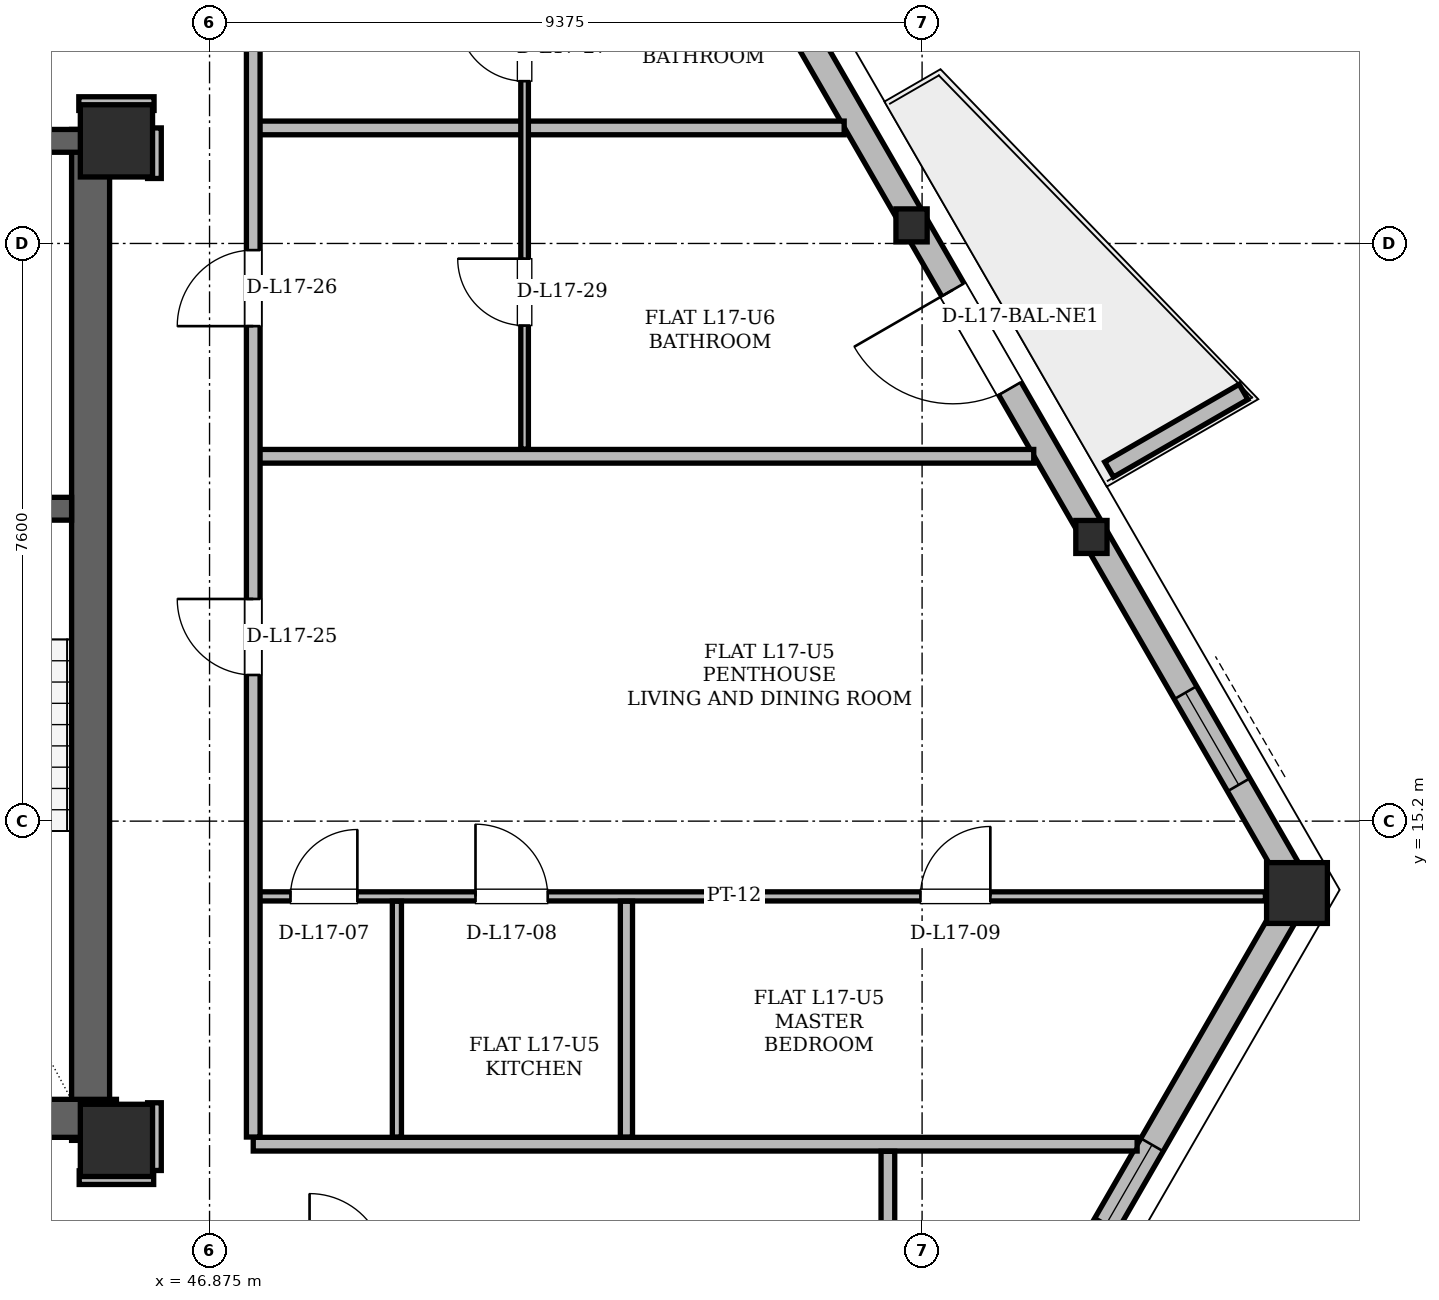
"""IFC4 building model, lengths in metres.
Left out: names, types, materials, properties, quantities, classifications, styles, units other than length and angle.
Written with IfcOpenShell. Run it as: python <this file> out.ifc"""

import sys

from ifc_helpers import new_model, si_unit, direction, frame, frame_2d, origin, origin_2d, place, context, subcontext, project, spatial, polyline, rectangle, hollow_rectangle, i_section, outline, extrude, element, fill, save


model = new_model("IFC4")
c1 = context("Model", 3, precision=1e-05, world=origin(), true_north=direction((0.0, 1.0)))
c2 = subcontext(c1, "Body", "Model", "MODEL_VIEW")
j1 = project(units=[si_unit("LENGTHUNIT", "METRE"), si_unit("PLANEANGLEUNIT", "RADIAN")], contexts=[c1])
p1 = place(None, origin())
s1 = spatial("IfcSite", under=j1, at=p1, CompositionType="ELEMENT")
p2 = place(p1, origin())
s2 = spatial("IfcBuilding", under=s1, at=p2, CompositionType="ELEMENT")
p3 = place(p2, frame((0.0, 0.0, 66.9)))
s3 = spatial("IfcBuildingStorey", under=s2, at=p3, CompositionType="ELEMENT", Elevation=66.9)
for number, where, z_axis, x_axis in (
    (1, (45.65, 11.0, 0.0), (0.0, 0.0, 1.0), (1.0, 0.0, 0.0)),
    (2, (45.65, 24.15, 0.0), (0.0, 0.0, 1.0), (1.0, 0.0, 0.0)),
):
    element("IfcColumn", number, at=place(p3, frame(where, z_axis=z_axis, x_axis=x_axis)), inside=s3, PredefinedType="COLUMN", context=c2, shape_type="SweptSolid", body=[
        extrude(hollow_rectangle(XDim=0.95, YDim=0.95, WallThickness=0.08, at=origin_2d()), origin(), (0.0, 0.0, 1.0), 3.6),
    ])
p4 = place(p3, frame((61.212, 14.297, 0.005), z_axis=(-0.016717385231, -0.023784897687, 0.999577314505), x_axis=(0.818132254309, -0.575030098743, 0.0)))
e3 = element("IfcColumn", 3, at=p4, inside=s3, PredefinedType="COLUMN", context=c2, shape_type="SweptSolid", body=[
    extrude(hollow_rectangle(XDim=0.8, YDim=0.8, WallThickness=0.065, at=origin_2d()), origin(), (0.0, 0.0, 1.0), 3.593),
])
p5 = place(p3, frame((58.511, 18.975, 0.005), z_axis=(-0.018688884401, -0.020387873892, 0.999617456929), x_axis=(0.737154140201, -0.675724628517, 0.0)))
e4 = element("IfcColumn", 4, at=p5, inside=s3, PredefinedType="COLUMN", context=c2, shape_type="SweptSolid", body=[
    extrude(i_section(OverallWidth=0.411, OverallDepth=0.434, WebThickness=0.036, FlangeThickness=0.057, at=origin_2d()), origin(), (0.0, 0.0, 1.0), 3.593),
])
p6 = place(p3, frame((56.148, 23.069, 0.005), z_axis=(-0.020388348906, -0.017398057733, 0.999640746877), x_axis=(0.649119270697, -0.760686645348, 0.0)))
e5 = element("IfcColumn", 5, at=p6, inside=s3, PredefinedType="COLUMN", context=c2, shape_type="SweptSolid", body=[
    extrude(i_section(OverallWidth=0.411, OverallDepth=0.434, WebThickness=0.036, FlangeThickness=0.057, at=origin_2d()), origin(), (0.0, 0.0, 1.0), 3.592),
])
p7 = place(p3, frame((45.31, 11.0, 0.0), z_axis=(0.0, 0.0, 1.0), x_axis=(0.0, 1.0, 0.0)))
e6 = element("IfcWall", 6, at=p7, inside=s3, PredefinedType="SHEAR", context=c2, shape_type="SweptSolid", body=[
    extrude(rectangle(XDim=13.3, YDim=0.5, at=frame_2d((6.65, 0.0))), origin(), (0.0, 0.0, 1.0), 3.36),
])
p8 = place(p3, frame((38.55, 11.29, 0.0), z_axis=(0.0, 0.0, 1.0), x_axis=(1.0, 0.0, 0.0)))
e7 = element("IfcWall", 7, at=p8, inside=s3, PredefinedType="SHEAR", context=c2, shape_type="SweptSolid", body=[
    extrude(rectangle(XDim=7.1, YDim=0.5, at=frame_2d((3.55, 0.0))), origin(), (0.0, 0.0, 1.0), 3.36),
])
p9 = place(p3, frame((29.65, 24.15, 0.0), z_axis=(0.0, 0.0, 1.0), x_axis=(1.0, 0.0, 0.0)))
e8 = element("IfcWall", 8, at=p9, inside=s3, PredefinedType="SHEAR", context=c2, shape_type="SweptSolid", body=[
    extrude(rectangle(XDim=15.7, YDim=0.3, at=frame_2d((7.85, 0.0))), origin(), (0.0, 0.0, 1.0), 3.36),
])
p10 = place(p9, frame((1.7, 0.0, 0.0)))
e9 = element("IfcOpeningElement", 9, at=p10, cuts=e8, PredefinedType="OPENING", context=c2, shape_type="SweptSolid", body=[
    extrude(rectangle(XDim=1.2, YDim=2.2, at=frame_2d((0.6, 1.1))), frame((0.0, 0.15, 0.0), z_axis=(0.0, -1.0, 0.0), x_axis=(1.0, 0.0, 0.0)), (0.0, 0.0, 1.0), 0.3),
])
p11 = place(p9, frame((12.8, 0.0, 0.0)))
e10 = element("IfcOpeningElement", 10, at=p11, cuts=e8, PredefinedType="OPENING", context=c2, shape_type="SweptSolid", body=[
    extrude(rectangle(XDim=1.2, YDim=2.2, at=frame_2d((0.6, 1.1))), frame((0.0, 0.15, 0.0), z_axis=(0.0, -1.0, 0.0), x_axis=(1.0, 0.0, 0.0)), (0.0, 0.0, 1.0), 0.3),
])
p12 = place(p9, frame((6.55, 0.0, 0.0)))
e11 = element("IfcOpeningElement", 11, at=p12, cuts=e8, PredefinedType="OPENING", context=c2, shape_type="SweptSolid", body=[
    extrude(rectangle(XDim=0.9, YDim=2.05, at=frame_2d((0.45, 1.025))), frame((0.0, 0.15, 0.0), z_axis=(0.0, -1.0, 0.0), x_axis=(1.0, 0.0, 0.0)), (0.0, 0.0, 1.0), 0.3),
])
p13 = place(p9, frame((8.45, 0.0, 0.0)))
e12 = element("IfcOpeningElement", 12, at=p13, cuts=e8, PredefinedType="OPENING", context=c2, shape_type="SweptSolid", body=[
    extrude(rectangle(XDim=0.9, YDim=2.05, at=frame_2d((0.45, 1.025))), frame((0.0, 0.15, 0.0), z_axis=(0.0, -1.0, 0.0), x_axis=(1.0, 0.0, 0.0)), (0.0, 0.0, 1.0), 0.3),
])
p14 = place(p3, frame((41.05, 19.31, 0.0), z_axis=(0.0, 0.0, 1.0), x_axis=(1.0, 0.0, 0.0)))
e13 = element("IfcWall", 13, at=p14, inside=s3, PredefinedType="SHEAR", context=c2, shape_type="SweptSolid", body=[
    extrude(rectangle(XDim=4.01, YDim=0.3, at=frame_2d((2.005, 0.0))), origin(), (0.0, 0.0, 1.0), 3.36),
])
p15 = place(p14, frame((1.6, 0.0, 0.0)))
e14 = element("IfcOpeningElement", 14, at=p15, cuts=e13, PredefinedType="OPENING", context=c2, shape_type="SweptSolid", body=[
    extrude(rectangle(XDim=1.4, YDim=2.2, at=frame_2d((0.7, 1.1))), frame((0.0, 0.15, 0.0), z_axis=(0.0, -1.0, 0.0), x_axis=(1.0, 0.0, 0.0)), (0.0, 0.0, 1.0), 0.3),
])
p16 = place(p3, frame((54.382, 2.466, 0.0), z_axis=(0.0, 0.0, 1.0), x_axis=(0.499986980295, 0.866032920584, 0.0)))
e15 = element("IfcWall", 15, at=p16, inside=s3, PredefinedType="SOLIDWALL", context=c2, shape_type="SweptSolid", body=[
    extrude(rectangle(XDim=13.661, YDim=0.34, at=frame_2d((6.831, 0.0))), origin(), (0.0, 0.0, 1.0), 2.494),
])
p17 = place(p16, frame((8.587, 0.0, 0.85)))
e16 = element("IfcOpeningElement", 16, at=p17, cuts=e15, PredefinedType="OPENING", context=c2, shape_type="SweptSolid", body=[
    extrude(rectangle(XDim=1.2, YDim=1.48, at=frame_2d((0.6, 0.74))), frame((0.0, 0.17, 0.0), z_axis=(0.0, -1.0, 0.0), x_axis=(1.0, 0.0, 0.0)), (0.0, 0.0, 1.0), 0.34),
])
p18 = place(p3, frame((61.212, 14.297, 0.0), z_axis=(0.0, 0.0, 1.0), x_axis=(-0.499997235847, 0.866026999663, 0.0)))
e17 = element("IfcWall", 17, at=p18, inside=s3, PredefinedType="SOLIDWALL", context=c2, shape_type="SweptSolid", body=[
    extrude(rectangle(XDim=33.763, YDim=0.34, at=frame_2d((16.882, 0.0))), origin(), (0.0, 0.0, 1.0), 2.494),
])
p19 = place(p18, frame((7.615, 0.0, 0.0)))
e18 = element("IfcOpeningElement", 18, at=p19, cuts=e17, PredefinedType="OPENING", context=c2, shape_type="SweptSolid", body=[
    extrude(rectangle(XDim=1.5, YDim=2.2, at=frame_2d((0.75, 1.1))), frame((0.0, 0.17, 0.0), z_axis=(0.0, -1.0, 0.0), x_axis=(1.0, 0.0, 0.0)), (0.0, 0.0, 1.0), 0.34),
])
p20 = place(p18, frame((25.894, 0.0, 0.0)))
e19 = element("IfcOpeningElement", 19, at=p20, cuts=e17, PredefinedType="OPENING", context=c2, shape_type="SweptSolid", body=[
    extrude(rectangle(XDim=1.5, YDim=2.2, at=frame_2d((0.75, 1.1))), frame((0.0, 0.17, 0.0), z_axis=(0.0, -1.0, 0.0), x_axis=(1.0, 0.0, 0.0)), (0.0, 0.0, 1.0), 0.34),
])
p21 = place(p18, frame((1.594, 0.0, 0.85)))
e20 = element("IfcOpeningElement", 20, at=p21, cuts=e17, PredefinedType="OPENING", context=c2, shape_type="SweptSolid", body=[
    extrude(rectangle(XDim=1.4, YDim=1.534, at=frame_2d((0.7, 0.767))), frame((0.0, 0.17, 0.0), z_axis=(0.0, -1.0, 0.0), x_axis=(1.0, 0.0, 0.0)), (0.0, 0.0, 1.0), 0.34),
])
p22 = place(p18, frame((20.533, 0.0, 0.85)))
e21 = element("IfcOpeningElement", 21, at=p22, cuts=e17, PredefinedType="OPENING", context=c2, shape_type="SweptSolid", body=[
    extrude(rectangle(XDim=1.2, YDim=1.48, at=frame_2d((0.6, 0.74))), frame((0.0, 0.17, 0.0), z_axis=(0.0, -1.0, 0.0), x_axis=(1.0, 0.0, 0.0)), (0.0, 0.0, 1.0), 0.34),
])
p23 = place(p18, frame((29.7, 0.0, 0.85)))
e22 = element("IfcOpeningElement", 22, at=p23, cuts=e17, PredefinedType="OPENING", context=c2, shape_type="SweptSolid", body=[
    extrude(rectangle(XDim=2.2, YDim=1.534, at=frame_2d((1.1, 0.767))), frame((0.0, 0.17, 0.0), z_axis=(0.0, -1.0, 0.0), x_axis=(1.0, 0.0, 0.0)), (0.0, 0.0, 1.0), 0.34),
])
p24 = place(p18, frame((15.112, 0.0, 0.85)))
e23 = element("IfcOpeningElement", 23, at=p24, cuts=e17, PredefinedType="OPENING", context=c2, shape_type="SweptSolid", body=[
    extrude(rectangle(XDim=1.2, YDim=1.48, at=frame_2d((0.6, 0.74))), frame((0.0, 0.17, 0.0), z_axis=(0.0, -1.0, 0.0), x_axis=(1.0, 0.0, 0.0)), (0.0, 0.0, 1.0), 0.34),
])
p25 = place(p18, frame((17.864, 0.0, 0.85)))
e24 = element("IfcOpeningElement", 24, at=p25, cuts=e17, PredefinedType="OPENING", context=c2, shape_type="SweptSolid", body=[
    extrude(rectangle(XDim=1.2, YDim=1.48, at=frame_2d((0.6, 0.74))), frame((0.0, 0.17, 0.0), z_axis=(0.0, -1.0, 0.0), x_axis=(1.0, 0.0, 0.0)), (0.0, 0.0, 1.0), 0.34),
])
p26 = place(p3, frame((58.711, 19.826, 0.0), z_axis=(0.0, 0.0, 1.0), x_axis=(0.866012356593, 0.500022597718, 0.0)))
e25 = element("IfcWall", 25, at=p26, inside=s3, PredefinedType="PARAPET", context=c2, shape_type="SweptSolid", body=[
    extrude(outline(polyline([(0.0, 0.0), (2.042, 0.0), (2.042, 1.1), (0.0, 1.32), (0.0, 0.0)])), frame((0.0, 0.115, 0.0), z_axis=(0.0, -1.0, 0.0), x_axis=(1.0, 0.0, 0.0)), (0.0, 0.0, 1.0), 0.23),
])
p27 = place(p3, frame((45.16, 10.51, 0.0), z_axis=(0.0, 0.0, 1.0), x_axis=(1.0, 0.0, 0.0)))
e26 = element("IfcWall", 26, at=p27, inside=s3, PredefinedType="PARTITIONING", context=c2, shape_type="SweptSolid", body=[
    extrude(rectangle(XDim=0.98, YDim=0.18, at=frame_2d((0.49, 0.0))), origin(), (0.0, 0.0, 1.0), 2.738),
])
p28 = place(p3, frame((47.45, 10.95, 0.0), z_axis=(0.0, 0.0, 1.0), x_axis=(1.0, 0.0, 0.0)))
e27 = element("IfcWall", 27, at=p28, inside=s3, PredefinedType="PARTITIONING", context=c2, shape_type="SweptSolid", body=[
    extrude(rectangle(XDim=11.629, YDim=0.18, at=frame_2d((5.814, 0.0))), origin(), (0.0, 0.0, 1.0), 3.36),
])
p29 = place(p3, frame((47.4, 14.21, 0.0), z_axis=(0.0, 0.0, 1.0), x_axis=(1.0, 0.0, 0.0)))
e28 = element("IfcWall", 28, at=p29, inside=s3, PredefinedType="PARTITIONING", context=c2, shape_type="SweptSolid", body=[
    extrude(rectangle(XDim=13.368, YDim=0.12, at=frame_2d((6.684, 0.0))), origin(), (0.0, 0.0, 1.0), 2.738),
])
p30 = place(p29, frame((0.54, 0.0, 0.0)))
e29 = element("IfcOpeningElement", 29, at=p30, cuts=e28, PredefinedType="OPENING", context=c2, shape_type="SweptSolid", body=[
    extrude(rectangle(XDim=0.88, YDim=2.08, at=frame_2d((0.44, 1.04))), frame((0.0, 0.06, 0.0), z_axis=(0.0, -1.0, 0.0), x_axis=(1.0, 0.0, 0.0)), (0.0, 0.0, 1.0), 0.12),
])
p31 = place(p29, frame((2.974, 0.0, 0.0)))
e30 = element("IfcOpeningElement", 30, at=p31, cuts=e28, PredefinedType="OPENING", context=c2, shape_type="SweptSolid", body=[
    extrude(rectangle(XDim=0.95, YDim=2.1, at=frame_2d((0.475, 1.05))), frame((0.0, 0.06, 0.0), z_axis=(0.0, -1.0, 0.0), x_axis=(1.0, 0.0, 0.0)), (0.0, 0.0, 1.0), 0.12),
])
p32 = place(p29, frame((8.828, 0.0, 0.0)))
e31 = element("IfcOpeningElement", 31, at=p32, cuts=e28, PredefinedType="OPENING", context=c2, shape_type="SweptSolid", body=[
    extrude(rectangle(XDim=0.92, YDim=2.12, at=frame_2d((0.46, 1.06))), frame((0.0, 0.06, 0.0), z_axis=(0.0, -1.0, 0.0), x_axis=(1.0, 0.0, 0.0)), (0.0, 0.0, 1.0), 0.12),
])
p33 = place(p3, frame((47.45, 20.0, 0.0), z_axis=(0.0, 0.0, 1.0), x_axis=(1.0, 0.0, 0.0)))
e32 = element("IfcWall", 32, at=p33, inside=s3, PredefinedType="PARTITIONING", context=c2, shape_type="SweptSolid", body=[
    extrude(rectangle(XDim=10.269, YDim=0.18, at=frame_2d((5.135, 0.0))), origin(), (0.0, 0.0, 1.0), 3.36),
])
p34 = place(p3, frame((47.45, 24.32, 0.0), z_axis=(0.0, 0.0, 1.0), x_axis=(1.0, 0.0, 0.0)))
e33 = element("IfcWall", 33, at=p34, inside=s3, PredefinedType="PARTITIONING", context=c2, shape_type="SweptSolid", body=[
    extrude(rectangle(XDim=7.775, YDim=0.18, at=frame_2d((3.887, 0.0))), origin(), (0.0, 0.0, 1.0), 3.36),
])
p35 = place(p3, frame((45.155, 24.64, 0.0), z_axis=(0.0, 0.0, 1.0), x_axis=(1.0, 0.0, 0.0)))
e34 = element("IfcWall", 34, at=p35, inside=s3, PredefinedType="PARTITIONING", context=c2, shape_type="SweptSolid", body=[
    extrude(rectangle(XDim=0.99, YDim=0.18, at=frame_2d((0.495, 0.0))), origin(), (0.0, 0.0, 1.0), 2.738),
])
p36 = place(p3, frame((46.15, 10.604, 0.0), z_axis=(0.0, 0.0, 1.0), x_axis=(0.0, 1.0, 0.0)))
e35 = element("IfcWall", 35, at=p36, inside=s3, PredefinedType="PARTITIONING", context=c2, shape_type="SweptSolid", body=[
    extrude(rectangle(XDim=0.891, YDim=0.18, at=frame_2d((0.446, 0.0))), origin(), (0.0, 0.0, 1.0), 2.738),
])
p37 = place(p3, frame((46.15, 23.655, 0.0), z_axis=(0.0, 0.0, 1.0), x_axis=(0.0, 1.0, 0.0)))
e36 = element("IfcWall", 36, at=p37, inside=s3, PredefinedType="PARTITIONING", context=c2, shape_type="SweptSolid", body=[
    extrude(rectangle(XDim=0.665, YDim=0.18, at=frame_2d((0.333, 0.0))), origin(), (0.0, 0.0, 1.0), 2.946),
])
p38 = place(p3, frame((47.45, 11.044, 0.0), z_axis=(0.0, 0.0, 1.0), x_axis=(0.0, 1.0, 0.0)))
e37 = element("IfcWall", 37, at=p38, inside=s3, PredefinedType="PARTITIONING", context=c2, shape_type="SweptSolid", body=[
    extrude(rectangle(XDim=14.832, YDim=0.18, at=frame_2d((7.416, 0.0))), origin(), (0.0, 0.0, 1.0), 2.738),
])
p39 = place(p38, frame((6.079, 0.0, 0.0)))
e38 = element("IfcOpeningElement", 38, at=p39, cuts=e37, PredefinedType="OPENING", context=c2, shape_type="SweptSolid", body=[
    extrude(rectangle(XDim=1.0, YDim=2.18, at=frame_2d((0.5, 1.09))), frame((0.0, 0.09, 0.0), z_axis=(0.0, -1.0, 0.0), x_axis=(1.0, 0.0, 0.0)), (0.0, 0.0, 1.0), 0.18),
])
p40 = place(p38, frame((10.668, 0.0, 0.0)))
e39 = element("IfcOpeningElement", 39, at=p40, cuts=e37, PredefinedType="OPENING", context=c2, shape_type="SweptSolid", body=[
    extrude(rectangle(XDim=1.0, YDim=2.18, at=frame_2d((0.5, 1.09))), frame((0.0, 0.09, 0.0), z_axis=(0.0, -1.0, 0.0), x_axis=(1.0, 0.0, 0.0)), (0.0, 0.0, 1.0), 0.18),
])
p41 = place(p3, frame((49.34, 11.044, 0.0), z_axis=(0.0, 0.0, 1.0), x_axis=(0.0, 1.0, 0.0)))
e40 = element("IfcWall", 40, at=p41, inside=s3, PredefinedType="PARTITIONING", context=c2, shape_type="SweptSolid", body=[
    extrude(rectangle(XDim=3.102, YDim=0.12, at=frame_2d((1.551, 0.0))), origin(), (0.0, 0.0, 1.0), 2.738),
])
p42 = place(p3, frame((51.02, 20.094, 0.0), z_axis=(0.0, 0.0, 1.0), x_axis=(0.0, 1.0, 0.0)))
e41 = element("IfcWall", 41, at=p42, inside=s3, PredefinedType="PARTITIONING", context=c2, shape_type="SweptSolid", body=[
    extrude(rectangle(XDim=11.509, YDim=0.1, at=frame_2d((5.754, 0.0))), origin(), (0.0, 0.0, 1.0), 2.494),
])
p43 = place(p42, frame((4.841, 0.0, 0.0)))
e42 = element("IfcOpeningElement", 42, at=p43, cuts=e41, PredefinedType="OPENING", context=c2, shape_type="SweptSolid", body=[
    extrude(rectangle(XDim=0.88, YDim=2.08, at=frame_2d((0.44, 1.04))), frame((0.0, 0.05, 0.0), z_axis=(0.0, -1.0, 0.0), x_axis=(1.0, 0.0, 0.0)), (0.0, 0.0, 1.0), 0.1),
])
p44 = place(p42, frame((8.5, 0.0, 0.0)))
e43 = element("IfcOpeningElement", 43, at=p44, cuts=e41, PredefinedType="OPENING", context=c2, shape_type="SweptSolid", body=[
    extrude(rectangle(XDim=0.95, YDim=2.1, at=frame_2d((0.475, 1.05))), frame((0.0, 0.05, 0.0), z_axis=(0.0, -1.0, 0.0), x_axis=(1.0, 0.0, 0.0)), (0.0, 0.0, 1.0), 0.1),
])
p45 = place(p42, frame((1.626, 0.0, 0.0)))
e44 = element("IfcOpeningElement", 44, at=p45, cuts=e41, PredefinedType="OPENING", context=c2, shape_type="SweptSolid", body=[
    extrude(rectangle(XDim=0.88, YDim=2.08, at=frame_2d((0.44, 1.04))), frame((0.0, 0.05, 0.0), z_axis=(0.0, -1.0, 0.0), x_axis=(1.0, 0.0, 0.0)), (0.0, 0.0, 1.0), 0.1),
])
p46 = place(p3, frame((52.36, 11.044, 0.0), z_axis=(0.0, 0.0, 1.0), x_axis=(0.0, 1.0, 0.0)))
e45 = element("IfcWall", 45, at=p46, inside=s3, PredefinedType="PARTITIONING", context=c2, shape_type="SweptSolid", body=[
    extrude(rectangle(XDim=3.102, YDim=0.16, at=frame_2d((1.551, 0.0))), origin(), (0.0, 0.0, 1.0), 2.738),
])
p47 = place(p3, frame((55.8, 9.394, 0.0), z_axis=(0.0, 0.0, 1.0), x_axis=(0.0, 1.0, 0.0)))
e46 = element("IfcWall", 46, at=p47, inside=s3, PredefinedType="PARTITIONING", context=c2, shape_type="SweptSolid", body=[
    extrude(rectangle(XDim=1.462, YDim=0.18, at=frame_2d((0.731, 0.0))), origin(), (0.0, 0.0, 1.0), 3.36),
])
p48 = place(p19, origin())
e47 = element("IfcDoor", 47, at=p48, inside=s3, OperationType="SINGLE_SWING_RIGHT", PredefinedType="DOOR", context=c2, shape_type="SweptSolid", body=[
    extrude(rectangle(XDim=1.5, YDim=2.2, at=frame_2d((0.75, 1.1))), frame((0.0, 0.025, 0.0), z_axis=(0.0, -1.0, 0.0), x_axis=(1.0, 0.0, 0.0)), (0.0, 0.0, 1.0), 0.05),
])
fill(e18, e47)
p49 = place(p21, origin())
e48 = element("IfcWindow", 48, at=p49, inside=s3, PartitioningType="SINGLE_PANEL", PredefinedType="WINDOW", context=c2, shape_type="SweptSolid", body=[
    extrude(rectangle(XDim=1.4, YDim=1.534, at=frame_2d((0.7, 0.767))), frame((0.0, 0.03, 0.0), z_axis=(0.0, -1.0, 0.0), x_axis=(1.0, 0.0, 0.0)), (0.0, 0.0, 1.0), 0.06),
])
fill(e20, e48)
p50 = place(p17, origin())
e49 = element("IfcWindow", 49, at=p50, inside=s3, PartitioningType="SINGLE_PANEL", PredefinedType="WINDOW", context=c2, shape_type="SweptSolid", body=[
    extrude(rectangle(XDim=1.2, YDim=1.48, at=frame_2d((0.6, 0.74))), frame((0.0, 0.03, 0.0), z_axis=(0.0, -1.0, 0.0), x_axis=(1.0, 0.0, 0.0)), (0.0, 0.0, 1.0), 0.06),
])
fill(e16, e49)
p51 = place(p30, origin())
e50 = element("IfcDoor", 50, at=p51, inside=s3, OperationType="SINGLE_SWING_RIGHT", PredefinedType="DOOR", context=c2, shape_type="SweptSolid", body=[
    extrude(rectangle(XDim=0.88, YDim=2.08, at=frame_2d((0.44, 1.04))), frame((0.0, 0.025, 0.0), z_axis=(0.0, -1.0, 0.0), x_axis=(1.0, 0.0, 0.0)), (0.0, 0.0, 1.0), 0.05),
])
fill(e29, e50)
p52 = place(p31, origin())
e51 = element("IfcDoor", 51, at=p52, inside=s3, OperationType="SINGLE_SWING_LEFT", PredefinedType="DOOR", context=c2, shape_type="SweptSolid", body=[
    extrude(rectangle(XDim=0.95, YDim=2.1, at=frame_2d((0.475, 1.05))), frame((0.0, 0.025, 0.0), z_axis=(0.0, -1.0, 0.0), x_axis=(1.0, 0.0, 0.0)), (0.0, 0.0, 1.0), 0.05),
])
fill(e30, e51)
p53 = place(p32, origin())
e52 = element("IfcDoor", 52, at=p53, inside=s3, OperationType="SINGLE_SWING_RIGHT", PredefinedType="DOOR", context=c2, shape_type="SweptSolid", body=[
    extrude(rectangle(XDim=0.92, YDim=2.12, at=frame_2d((0.46, 1.06))), frame((0.0, 0.025, 0.0), z_axis=(0.0, -1.0, 0.0), x_axis=(1.0, 0.0, 0.0)), (0.0, 0.0, 1.0), 0.05),
])
fill(e31, e52)
p54 = place(p39, origin())
e53 = element("IfcDoor", 53, at=p54, inside=s3, OperationType="SINGLE_SWING_RIGHT", PredefinedType="DOOR", context=c2, shape_type="SweptSolid", body=[
    extrude(rectangle(XDim=1.0, YDim=2.18, at=frame_2d((0.5, 1.09))), frame((0.0, 0.025, 0.0), z_axis=(0.0, -1.0, 0.0), x_axis=(1.0, 0.0, 0.0)), (0.0, 0.0, 1.0), 0.05),
])
fill(e38, e53)
p55 = place(p40, origin())
e54 = element("IfcDoor", 54, at=p55, inside=s3, OperationType="SINGLE_SWING_LEFT", PredefinedType="DOOR", context=c2, shape_type="SweptSolid", body=[
    extrude(rectangle(XDim=1.0, YDim=2.18, at=frame_2d((0.5, 1.09))), frame((0.0, 0.025, 0.0), z_axis=(0.0, -1.0, 0.0), x_axis=(1.0, 0.0, 0.0)), (0.0, 0.0, 1.0), 0.05),
])
fill(e39, e54)
p56 = place(p43, origin())
e55 = element("IfcDoor", 55, at=p56, inside=s3, OperationType="SINGLE_SWING_RIGHT", PredefinedType="DOOR", context=c2, shape_type="SweptSolid", body=[
    extrude(rectangle(XDim=0.88, YDim=2.08, at=frame_2d((0.44, 1.04))), frame((0.0, 0.025, 0.0), z_axis=(0.0, -1.0, 0.0), x_axis=(1.0, 0.0, 0.0)), (0.0, 0.0, 1.0), 0.05),
])
fill(e42, e55)
p57 = place(p45, origin())
e56 = element("IfcDoor", 56, at=p57, inside=s3, OperationType="SINGLE_SWING_RIGHT", PredefinedType="DOOR", context=c2, shape_type="SweptSolid", body=[
    extrude(rectangle(XDim=0.88, YDim=2.08, at=frame_2d((0.44, 1.04))), frame((0.0, 0.025, 0.0), z_axis=(0.0, -1.0, 0.0), x_axis=(1.0, 0.0, 0.0)), (0.0, 0.0, 1.0), 0.05),
])
fill(e44, e56)
save(model, sys.argv[1])
